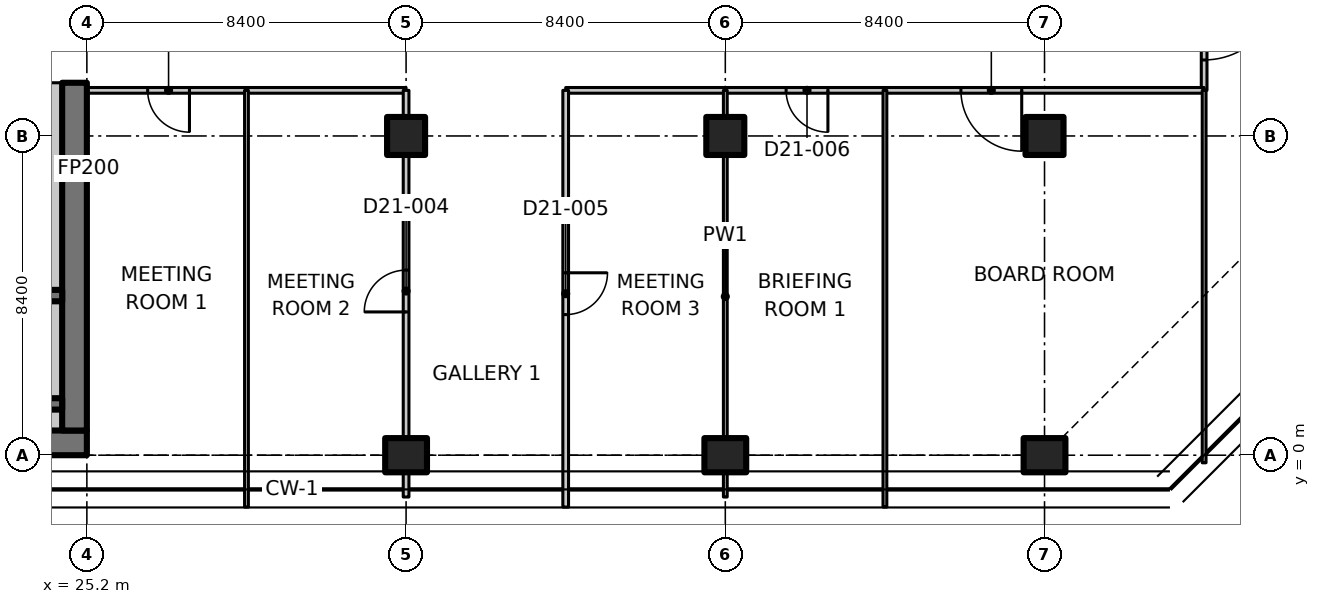
"""IFC4 building model, lengths in metres.
Left out: names, types, materials, properties, quantities, classifications, styles, units other than length and angle.
Written with IfcOpenShell. Run it as: python <this file> out.ifc"""

import sys

from ifc_helpers import new_model, si_unit, direction, frame, frame_2d, origin, origin_2d, place, context, subcontext, project, spatial, polyline, rectangle, outline, extrude, element, fill, save


model = new_model("IFC4")
c1 = context("Model", 3, precision=1e-05, world=origin(), true_north=direction((0.0, 1.0)))
c2 = subcontext(c1, "Body", "Model", "MODEL_VIEW")
j1 = project(units=[si_unit("LENGTHUNIT", "METRE"), si_unit("PLANEANGLEUNIT", "RADIAN")], contexts=[c1])
p1 = place(None, origin())
s1 = spatial("IfcSite", under=j1, at=p1, CompositionType="ELEMENT")
p2 = place(p1, origin())
s2 = spatial("IfcBuilding", under=s1, at=p2, CompositionType="ELEMENT")
p3 = place(p2, frame((0.0, 0.0, 170.4)))
s3 = spatial("IfcBuildingStorey", under=s2, at=p3, CompositionType="ELEMENT", Elevation=170.4)
p4 = place(p3, frame((33.6, 0.0, 0.0), z_axis=(0.0, 0.0, 1.0), x_axis=(0.0, 1.0, 0.0)))
e1 = element("IfcColumn", 1, at=p4, inside=s3, PredefinedType="COLUMN", context=c2, shape_type="SweptSolid", body=[
    extrude(rectangle(XDim=0.9, YDim=1.1, at=origin_2d()), origin(), (0.0, 0.0, 1.0), 3.35),
])
p5 = place(p3, frame((33.6, 8.4, 0.0), z_axis=(0.0, 0.0, 1.0), x_axis=(1.0, 0.0, 0.0)))
e2 = element("IfcColumn", 2, at=p5, inside=s3, PredefinedType="COLUMN", context=c2, shape_type="SweptSolid", body=[
    extrude(rectangle(XDim=1.0, YDim=1.0, at=origin_2d()), origin(), (0.0, 0.0, 1.0), 3.35),
])
p6 = place(p3, frame((42.0, 0.0, 0.0), z_axis=(0.0, 0.0, 1.0), x_axis=(0.0, 1.0, 0.0)))
e3 = element("IfcColumn", 3, at=p6, inside=s3, PredefinedType="COLUMN", context=c2, shape_type="SweptSolid", body=[
    extrude(rectangle(XDim=0.9, YDim=1.1, at=origin_2d()), origin(), (0.0, 0.0, 1.0), 3.35),
])
p7 = place(p3, frame((42.0, 8.4, 0.0), z_axis=(0.0, 0.0, 1.0), x_axis=(1.0, 0.0, 0.0)))
e4 = element("IfcColumn", 4, at=p7, inside=s3, PredefinedType="COLUMN", context=c2, shape_type="SweptSolid", body=[
    extrude(rectangle(XDim=1.0, YDim=1.0, at=origin_2d()), origin(), (0.0, 0.0, 1.0), 3.35),
])
p8 = place(p3, frame((50.4, 0.0, 0.0), z_axis=(0.0, 0.0, 1.0), x_axis=(0.0, 1.0, 0.0)))
e5 = element("IfcColumn", 5, at=p8, inside=s3, PredefinedType="COLUMN", context=c2, shape_type="SweptSolid", body=[
    extrude(rectangle(XDim=0.9, YDim=1.1, at=origin_2d()), origin(), (0.0, 0.0, 1.0), 3.35),
])
p9 = place(p3, frame((50.4, 8.4, 0.0), z_axis=(0.0, 0.0, 1.0), x_axis=(1.0, 0.0, 0.0)))
e6 = element("IfcColumn", 6, at=p9, inside=s3, PredefinedType="COLUMN", context=c2, shape_type="SweptSolid", body=[
    extrude(rectangle(XDim=1.0, YDim=1.0, at=origin_2d()), origin(), (0.0, 0.0, 1.0), 3.35),
])
p10 = place(p3, frame((7.286, 0.325, 0.0), z_axis=(0.0, 0.0, 1.0), x_axis=(1.0, 0.0, 0.0)))
e7 = element("IfcWall", 7, at=p10, inside=s3, PredefinedType="SHEAR", context=c2, shape_type="SweptSolid", body=[
    extrude(rectangle(XDim=17.914, YDim=0.65, at=frame_2d((8.957, 0.0))), origin(), (0.0, 0.0, 1.0), 3.35),
])
p11 = place(p3, frame((24.875, 0.65, 0.0), z_axis=(0.0, 0.0, 1.0), x_axis=(0.0, 1.0, 0.0)))
e8 = element("IfcWall", 8, at=p11, inside=s3, PredefinedType="SHEAR", context=c2, shape_type="SweptSolid", body=[
    extrude(rectangle(XDim=9.15, YDim=0.65, at=frame_2d((4.575, 0.0))), origin(), (0.0, 0.0, 1.0), 3.35),
])
p12 = place(p3, frame((15.8, 1.35, 0.0), z_axis=(0.0, 0.0, 1.0), x_axis=(1.0, 0.0, 0.0)))
e9 = element("IfcWall", 9, at=p12, inside=s3, PredefinedType="SHEAR", context=c2, shape_type="SweptSolid", body=[
    extrude(rectangle(XDim=8.75, YDim=0.3, at=frame_2d((4.375, 0.0))), origin(), (0.0, 0.0, 1.0), 3.35),
])
p13 = place(p3, frame((15.8, 4.2, 0.0), z_axis=(0.0, 0.0, 1.0), x_axis=(1.0, 0.0, 0.0)))
e10 = element("IfcWall", 10, at=p13, inside=s3, PredefinedType="SHEAR", context=c2, shape_type="SweptSolid", body=[
    extrude(rectangle(XDim=8.75, YDim=0.3, at=frame_2d((4.375, 0.0))), origin(), (0.0, 0.0, 1.0), 3.35),
])
p14 = place(p13, frame((0.4, 0.0, 0.0)))
e11 = element("IfcOpeningElement", 11, at=p14, cuts=e10, PredefinedType="OPENING", context=c2, shape_type="SweptSolid", body=[
    extrude(rectangle(XDim=1.0, YDim=2.1, at=frame_2d((0.5, 1.05))), frame((0.0, 0.16, 0.0), z_axis=(0.0, -1.0, 0.0), x_axis=(1.0, 0.0, 0.0)), (0.0, 0.0, 1.0), 0.32),
])
p15 = place(p3, frame((13.35, 0.925, 0.0), z_axis=(0.0, 0.0, 1.0), x_axis=(1.0, 0.0, 0.0)))
e12 = element("IfcWall", 12, at=p15, inside=s3, PredefinedType="PARTITIONING", context=c2, shape_type="SweptSolid", body=[
    extrude(rectangle(XDim=11.2, YDim=0.55, at=frame_2d((5.6, 0.0))), origin(), (0.0, 0.0, 1.0), 3.35),
])
p16 = place(p3, frame((24.275, 1.5, 0.0), z_axis=(0.0, 0.0, 1.0), x_axis=(0.0, 1.0, 0.0)))
e13 = element("IfcWall", 13, at=p16, inside=s3, PredefinedType="PARTITIONING", context=c2, shape_type="SweptSolid", body=[
    extrude(rectangle(XDim=2.55, YDim=0.55, at=frame_2d((1.275, 0.0))), origin(), (0.0, 0.0, 1.0), 3.35),
])
p17 = place(p3, frame((24.275, 4.35, 0.0), z_axis=(0.0, 0.0, 1.0), x_axis=(0.0, 1.0, 0.0)))
e14 = element("IfcWall", 14, at=p17, inside=s3, PredefinedType="PARTITIONING", context=c2, shape_type="SweptSolid", body=[
    extrude(rectangle(XDim=5.45, YDim=0.55, at=frame_2d((2.725, 0.0))), origin(), (0.0, 0.0, 1.0), 3.35),
])
p18 = place(p3, frame((29.4, 9.6, 0.0), z_axis=(0.0, 0.0, 1.0), x_axis=(-1.0, 0.0, 0.0)))
e15 = element("IfcWall", 15, at=p18, inside=s3, PredefinedType="PARTITIONING", context=c2, shape_type="SweptSolid", body=[
    extrude(rectangle(XDim=4.2, YDim=0.15, at=frame_2d((2.1, 0.0))), origin(), (0.0, 0.0, 1.0), 3.33),
])
p19 = place(p18, frame((1.5, 0.0, 0.0)))
e16 = element("IfcOpeningElement", 16, at=p19, cuts=e15, PredefinedType="OPENING", context=c2, shape_type="SweptSolid", body=[
    extrude(rectangle(XDim=1.1, YDim=2.1, at=frame_2d((0.55, 1.05))), frame((0.0, 0.085, 0.0), z_axis=(0.0, -1.0, 0.0), x_axis=(1.0, 0.0, 0.0)), (0.0, 0.0, 1.0), 0.17),
])
p20 = place(p3, frame((54.6, 13.0, 0.0), z_axis=(0.0, 0.0, 1.0), x_axis=(0.0, -1.0, 0.0)))
e17 = element("IfcWall", 17, at=p20, inside=s3, PredefinedType="PARTITIONING", context=c2, shape_type="SweptSolid", body=[
    extrude(rectangle(XDim=3.4, YDim=0.15, at=frame_2d((1.7, 0.0))), origin(), (0.0, 0.0, 1.0), 3.33),
])
p21 = place(p20, frame((0.6, 0.0, 0.0)))
e18 = element("IfcOpeningElement", 18, at=p21, cuts=e17, PredefinedType="OPENING", context=c2, shape_type="SweptSolid", body=[
    extrude(rectangle(XDim=2.0, YDim=2.4, at=frame_2d((1.0, 1.2))), frame((0.0, 0.085, 0.0), z_axis=(0.0, -1.0, 0.0), x_axis=(1.0, 0.0, 0.0)), (0.0, 0.0, 1.0), 0.17),
])
p22 = place(p3, frame((33.6, 9.6, 0.0), z_axis=(0.0, 0.0, 1.0), x_axis=(-1.0, 0.0, 0.0)))
e19 = element("IfcWall", 19, at=p22, inside=s3, PredefinedType="PARTITIONING", context=c2, shape_type="SweptSolid", body=[
    extrude(rectangle(XDim=4.2, YDim=0.15, at=frame_2d((2.1, 0.0))), origin(), (0.0, 0.0, 1.0), 3.33),
])
p23 = place(p3, frame((42.0, 9.6, 0.0), z_axis=(0.0, 0.0, 1.0), x_axis=(-1.0, 0.0, 0.0)))
e20 = element("IfcWall", 20, at=p23, inside=s3, PredefinedType="PARTITIONING", context=c2, shape_type="SweptSolid", body=[
    extrude(rectangle(XDim=4.2, YDim=0.15, at=frame_2d((2.1, 0.0))), origin(), (0.0, 0.0, 1.0), 3.33),
])
p24 = place(p3, frame((46.2, 9.6, 0.0), z_axis=(0.0, 0.0, 1.0), x_axis=(-1.0, 0.0, 0.0)))
e21 = element("IfcWall", 21, at=p24, inside=s3, PredefinedType="PARTITIONING", context=c2, shape_type="SweptSolid", body=[
    extrude(rectangle(XDim=4.2, YDim=0.15, at=frame_2d((2.1, 0.0))), origin(), (0.0, 0.0, 1.0), 3.33),
])
p25 = place(p24, frame((1.5, 0.0, 0.0)))
e22 = element("IfcOpeningElement", 22, at=p25, cuts=e21, PredefinedType="OPENING", context=c2, shape_type="SweptSolid", body=[
    extrude(rectangle(XDim=1.1, YDim=2.1, at=frame_2d((0.55, 1.05))), frame((0.0, 0.085, 0.0), z_axis=(0.0, -1.0, 0.0), x_axis=(1.0, 0.0, 0.0)), (0.0, 0.0, 1.0), 0.17),
])
p26 = place(p3, frame((54.6, 9.6, 0.0), z_axis=(0.0, 0.0, 1.0), x_axis=(-1.0, 0.0, 0.0)))
e23 = element("IfcWall", 23, at=p26, inside=s3, PredefinedType="PARTITIONING", context=c2, shape_type="SweptSolid", body=[
    extrude(rectangle(XDim=8.4, YDim=0.15, at=frame_2d((4.2, 0.0))), origin(), (0.0, 0.0, 1.0), 3.33),
])
p27 = place(p26, frame((4.8, 0.0, 0.0)))
e24 = element("IfcOpeningElement", 24, at=p27, cuts=e23, PredefinedType="OPENING", context=c2, shape_type="SweptSolid", body=[
    extrude(rectangle(XDim=1.6, YDim=2.1, at=frame_2d((0.8, 1.05))), frame((0.0, 0.085, 0.0), z_axis=(0.0, -1.0, 0.0), x_axis=(1.0, 0.0, 0.0)), (0.0, 0.0, 1.0), 0.17),
])
p28 = place(p3, frame((54.6, -0.2, 0.0), z_axis=(0.0, 0.0, 1.0), x_axis=(0.0, 1.0, 0.0)))
e25 = element("IfcWall", 25, at=p28, inside=s3, PredefinedType="PARTITIONING", context=c2, shape_type="SweptSolid", body=[
    extrude(outline(polyline([(0.0, 0.0), (9.8, 0.0), (9.8, 3.33), (5.066, 3.33), (5.064, 2.98), (3.736, 2.98), (3.734, 3.33), (0.0, 3.33), (0.0, 0.0)])), frame((0.0, 0.05, 0.0), z_axis=(0.0, -1.0, 0.0), x_axis=(1.0, 0.0, 0.0)), (0.0, 0.0, 1.0), 0.1),
])
p29 = place(p3, frame((33.6, -1.1, 0.0), z_axis=(0.0, 0.0, 1.0), x_axis=(0.0, 1.0, 0.0)))
e26 = element("IfcWall", 26, at=p29, inside=s3, PredefinedType="PARTITIONING", context=c2, shape_type="SweptSolid", body=[
    extrude(rectangle(XDim=0.63, YDim=0.15, at=frame_2d((0.315, 0.0))), origin(), (0.0, 0.0, 1.0), 3.33),
])
p30 = place(p3, frame((33.6, 0.47, 0.0), z_axis=(0.0, 0.0, 1.0), x_axis=(0.0, 1.0, 0.0)))
e27 = element("IfcWall", 27, at=p30, inside=s3, PredefinedType="PARTITIONING", context=c2, shape_type="SweptSolid", body=[
    extrude(rectangle(XDim=7.41, YDim=0.15, at=frame_2d((3.705, 0.0))), origin(), (0.0, 0.0, 1.0), 3.33),
])
p31 = place(p30, frame((3.3, 0.0, 0.0)))
e28 = element("IfcOpeningElement", 28, at=p31, cuts=e27, PredefinedType="OPENING", context=c2, shape_type="SweptSolid", body=[
    extrude(rectangle(XDim=1.1, YDim=2.1, at=frame_2d((0.55, 1.05))), frame((0.0, 0.085, 0.0), z_axis=(0.0, -1.0, 0.0), x_axis=(1.0, 0.0, 0.0)), (0.0, 0.0, 1.0), 0.17),
])
p32 = place(p3, frame((33.6, 8.92, 0.0), z_axis=(0.0, 0.0, 1.0), x_axis=(0.0, 1.0, 0.0)))
e29 = element("IfcWall", 29, at=p32, inside=s3, PredefinedType="PARTITIONING", context=c2, shape_type="SweptSolid", body=[
    extrude(rectangle(XDim=0.68, YDim=0.15, at=frame_2d((0.34, 0.0))), origin(), (0.0, 0.0, 1.0), 3.33),
])
p33 = place(p3, frame((37.8, 9.6, 0.0), z_axis=(0.0, 0.0, 1.0), x_axis=(0.0, -1.0, 0.0)))
e30 = element("IfcWall", 30, at=p33, inside=s3, PredefinedType="PARTITIONING", context=c2, shape_type="SweptSolid", body=[
    extrude(outline(polyline([(0.0, 0.0), (10.965, 0.0), (10.965, 3.33), (10.7, 3.33), (10.05, 3.33), (10.048, 2.98), (9.152, 2.98), (9.15, 3.33), (0.0, 3.33), (0.0, 0.0)])), frame((0.0, 0.075, 0.0), z_axis=(0.0, -1.0, 0.0), x_axis=(1.0, 0.0, 0.0)), (0.0, 0.0, 1.0), 0.15),
])
p34 = place(p33, frame((4.8, 0.0, 0.0)))
e31 = element("IfcOpeningElement", 31, at=p34, cuts=e30, PredefinedType="OPENING", context=c2, shape_type="SweptSolid", body=[
    extrude(rectangle(XDim=1.1, YDim=2.1, at=frame_2d((0.55, 1.05))), frame((0.0, 0.085, 0.0), z_axis=(0.0, -1.0, 0.0), x_axis=(1.0, 0.0, 0.0)), (0.0, 0.0, 1.0), 0.17),
])
p35 = place(p3, frame((29.4, 9.6, 0.0), z_axis=(0.0, 0.0, 1.0), x_axis=(0.0, -1.0, 0.0)))
e32 = element("IfcWall", 32, at=p35, inside=s3, PredefinedType="PARTITIONING", context=c2, shape_type="SweptSolid", body=[
    extrude(outline(polyline([(0.0, 0.0), (10.965, 0.0), (10.965, 3.33), (10.7, 3.33), (10.05, 3.33), (10.048, 2.98), (9.152, 2.98), (9.15, 3.33), (0.0, 3.33), (0.0, 0.0)])), frame((0.0, 0.05, 0.0), z_axis=(0.0, -1.0, 0.0), x_axis=(1.0, 0.0, 0.0)), (0.0, 0.0, 1.0), 0.1),
])
p36 = place(p3, frame((42.0, 9.6, 0.0), z_axis=(0.0, 0.0, 1.0), x_axis=(0.0, -1.0, 0.0)))
e33 = element("IfcWall", 33, at=p36, inside=s3, PredefinedType="PARTITIONING", context=c2, shape_type="SweptSolid", body=[
    extrude(rectangle(XDim=0.68, YDim=0.1, at=frame_2d((0.34, 0.0))), origin(), (0.0, 0.0, 1.0), 3.33),
])
p37 = place(p3, frame((42.0, 7.88, 0.0), z_axis=(0.0, 0.0, 1.0), x_axis=(0.0, -1.0, 0.0)))
e34 = element("IfcWall", 34, at=p37, inside=s3, PredefinedType="PARTITIONING", context=c2, shape_type="SweptSolid", body=[
    extrude(rectangle(XDim=7.41, YDim=0.1, at=frame_2d((3.705, 0.0))), origin(), (0.0, 0.0, 1.0), 3.33),
])
p38 = place(p3, frame((42.0, -0.47, 0.0), z_axis=(0.0, 0.0, 1.0), x_axis=(0.0, -1.0, 0.0)))
e35 = element("IfcWall", 35, at=p38, inside=s3, PredefinedType="PARTITIONING", context=c2, shape_type="SweptSolid", body=[
    extrude(rectangle(XDim=0.63, YDim=0.1, at=frame_2d((0.315, 0.0))), origin(), (0.0, 0.0, 1.0), 3.33),
])
p39 = place(p3, frame((46.2, 9.6, 0.0), z_axis=(0.0, 0.0, 1.0), x_axis=(0.0, -1.0, 0.0)))
e36 = element("IfcWall", 36, at=p39, inside=s3, PredefinedType="PARTITIONING", context=c2, shape_type="SweptSolid", body=[
    extrude(outline(polyline([(0.0, 0.0), (10.965, 0.0), (10.965, 3.33), (10.7, 3.33), (10.05, 3.33), (10.048, 2.98), (9.152, 2.98), (9.15, 3.33), (0.0, 3.33), (0.0, 0.0)])), frame((0.0, 0.05, 0.0), z_axis=(0.0, -1.0, 0.0), x_axis=(1.0, 0.0, 0.0)), (0.0, 0.0, 1.0), 0.1),
])
p40 = place(p21, origin())
e37 = element("IfcDoor", 37, at=p40, inside=s3, OperationType="DOUBLE_DOOR_SINGLE_SWING", PredefinedType="DOOR", context=c2, shape_type="SweptSolid", body=[
    extrude(rectangle(XDim=2.0, YDim=2.4, at=frame_2d((1.0, 1.2))), frame((0.0, 0.025, 0.0), z_axis=(0.0, -1.0, 0.0), x_axis=(1.0, 0.0, 0.0)), (0.0, 0.0, 1.0), 0.05),
])
fill(e18, e37)
p41 = place(p19, origin())
e38 = element("IfcDoor", 38, at=p41, inside=s3, OperationType="SINGLE_SWING_LEFT", PredefinedType="DOOR", context=c2, shape_type="SweptSolid", body=[
    extrude(rectangle(XDim=1.1, YDim=2.1, at=frame_2d((0.55, 1.05))), frame((0.0, 0.025, 0.0), z_axis=(0.0, -1.0, 0.0), x_axis=(1.0, 0.0, 0.0)), (0.0, 0.0, 1.0), 0.05),
])
fill(e16, e38)
p42 = place(p31, origin())
e39 = element("IfcDoor", 39, at=p42, inside=s3, OperationType="SINGLE_SWING_LEFT", PredefinedType="DOOR", context=c2, shape_type="SweptSolid", body=[
    extrude(rectangle(XDim=1.1, YDim=2.1, at=frame_2d((0.55, 1.05))), frame((0.0, 0.025, 0.0), z_axis=(0.0, -1.0, 0.0), x_axis=(1.0, 0.0, 0.0)), (0.0, 0.0, 1.0), 0.05),
])
fill(e28, e39)
p43 = place(p34, origin())
e40 = element("IfcDoor", 40, at=p43, inside=s3, OperationType="SINGLE_SWING_LEFT", PredefinedType="DOOR", context=c2, shape_type="SweptSolid", body=[
    extrude(rectangle(XDim=1.1, YDim=2.1, at=frame_2d((0.55, 1.05))), frame((0.0, 0.025, 0.0), z_axis=(0.0, -1.0, 0.0), x_axis=(1.0, 0.0, 0.0)), (0.0, 0.0, 1.0), 0.05),
])
fill(e31, e40)
p44 = place(p25, origin())
e41 = element("IfcDoor", 41, at=p44, inside=s3, OperationType="SINGLE_SWING_LEFT", PredefinedType="DOOR", context=c2, shape_type="SweptSolid", body=[
    extrude(rectangle(XDim=1.1, YDim=2.1, at=frame_2d((0.55, 1.05))), frame((0.0, 0.025, 0.0), z_axis=(0.0, -1.0, 0.0), x_axis=(1.0, 0.0, 0.0)), (0.0, 0.0, 1.0), 0.05),
])
fill(e22, e41)
p45 = place(p27, origin())
e42 = element("IfcDoor", 42, at=p45, inside=s3, OperationType="DOUBLE_DOOR_SINGLE_SWING", PredefinedType="DOOR", context=c2, shape_type="SweptSolid", body=[
    extrude(rectangle(XDim=1.6, YDim=2.1, at=frame_2d((0.8, 1.05))), frame((0.0, 0.025, 0.0), z_axis=(0.0, -1.0, 0.0), x_axis=(1.0, 0.0, 0.0)), (0.0, 0.0, 1.0), 0.05),
])
fill(e24, e42)
save(model, sys.argv[1])
